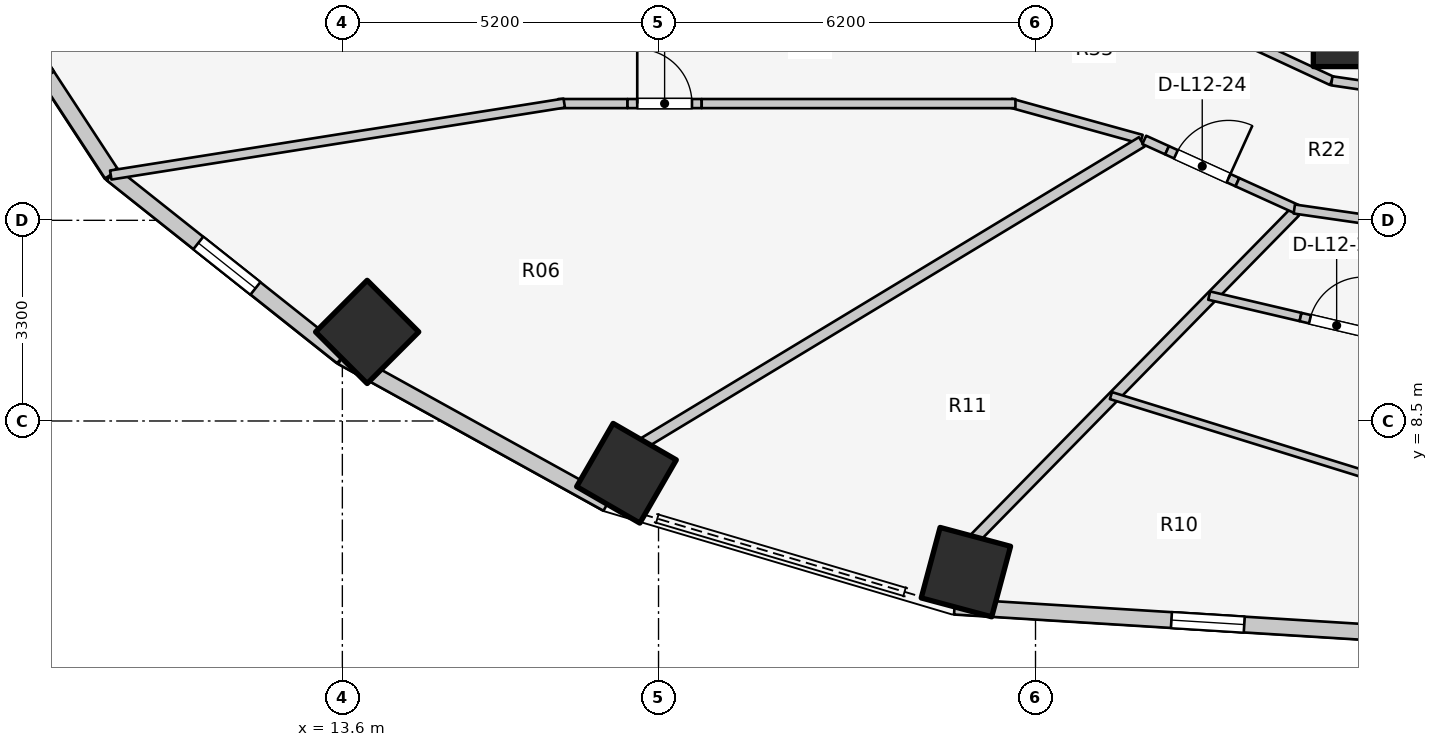
"""IFC4 building model, lengths in metres.
Left out: names, types, materials, properties, quantities, classifications, styles, units other than length and angle.
Written with IfcOpenShell. Run it as: python <this file> out.ifc"""

import sys

from ifc_helpers import new_model, si_unit, direction, frame, frame_2d, origin, origin_2d, place, context, subcontext, project, spatial, rectangle, extrude, element, fill, save


model = new_model("IFC4")
c1 = context("Model", 3, precision=1e-05, world=origin(), true_north=direction((0.0, 1.0)))
c2 = subcontext(c1, "Body", "Model", "MODEL_VIEW")
j1 = project(units=[si_unit("LENGTHUNIT", "METRE"), si_unit("PLANEANGLEUNIT", "RADIAN")], contexts=[c1])
p1 = place(None, origin())
s1 = spatial("IfcSite", under=j1, at=p1, CompositionType="ELEMENT")
p2 = place(p1, origin())
s2 = spatial("IfcBuilding", under=s1, at=p2, CompositionType="ELEMENT")
p3 = place(p2, frame((0.0, 0.0, 43.1)))
s3 = spatial("IfcBuildingStorey", under=s2, at=p3, CompositionType="ELEMENT", Elevation=43.1)
for number, where, z_axis, x_axis in (
    (1, (14.008, 9.965, 0.0), (0.0, 0.0, 1.0), (-0.707, -0.707, 0.0)),
    (2, (18.273, 7.641, 0.0), (0.0, 0.0, 1.0), (-0.5, -0.866, 0.0)),
):
    element("IfcColumn", number, at=place(p3, frame(where, z_axis=z_axis, x_axis=x_axis)), inside=s3, PredefinedType="COLUMN", context=c2, shape_type="SweptSolid", body=[
        extrude(rectangle(XDim=1.2, YDim=1.2, at=origin_2d()), origin(), (0.0, 0.0, 1.0), 3.1),
    ])
p4 = place(p3, frame((30.069, 14.828, 0.0), z_axis=(0.0, 0.0, 1.0), x_axis=(1.0, 0.0, 0.0)))
e3 = element("IfcColumn", 3, at=p4, inside=s3, PredefinedType="COLUMN", context=c2, shape_type="SweptSolid", body=[
    extrude(rectangle(XDim=1.0, YDim=1.0, at=origin_2d()), origin(), (0.0, 0.0, 1.0), 3.1),
])
p5 = place(p3, frame((23.855, 6.014, 0.0), z_axis=(0.0, 0.0, 1.0), x_axis=(-0.258819045103, -0.965925826289, 0.0)))
e4 = element("IfcColumn", 4, at=p5, inside=s3, PredefinedType="COLUMN", context=c2, shape_type="SweptSolid", body=[
    extrude(rectangle(XDim=1.2, YDim=1.2, at=origin_2d()), origin(), (0.0, 0.0, 1.0), 3.1),
])
p6 = place(p3, frame((7.033, 16.795, 0.0), z_axis=(0.0, 0.0, 1.0), x_axis=(0.547702757047, -0.836672988642, 0.0)))
e5 = element("IfcWall", 5, at=p6, inside=s3, PredefinedType="STANDARD", context=c2, shape_type="SweptSolid", body=[
    extrude(rectangle(XDim=5.062, YDim=0.26, at=frame_2d((2.531, 0.0))), origin(), (0.0, 0.0, 1.0), 1.22),
])
p7 = place(p6, frame((1.931, 0.0, 0.15)))
e6 = element("IfcOpeningElement", 6, at=p7, cuts=e5, PredefinedType="OPENING", context=c2, shape_type="SweptSolid", body=[
    extrude(rectangle(XDim=1.2, YDim=0.9, at=frame_2d((0.6, 0.45))), frame((0.0, 0.14, 0.0), z_axis=(0.0, -1.0, 0.0), x_axis=(1.0, 0.0, 0.0)), (0.0, 0.0, 1.0), 0.28),
])
p8 = place(p3, frame((9.806, 12.559, 0.0), z_axis=(0.0, 0.0, 1.0), x_axis=(0.783123133379, -0.621866672179, 0.0)))
e7 = element("IfcWall", 7, at=p8, inside=s3, PredefinedType="STANDARD", context=c2, shape_type="SweptSolid", body=[
    extrude(rectangle(XDim=4.839, YDim=0.26, at=frame_2d((2.419, 0.0))), origin(), (0.0, 0.0, 1.0), 1.22),
])
p9 = place(p8, frame((1.819, 0.0, 0.15)))
e8 = element("IfcOpeningElement", 8, at=p9, cuts=e7, PredefinedType="OPENING", context=c2, shape_type="SweptSolid", body=[
    extrude(rectangle(XDim=1.2, YDim=0.9, at=frame_2d((0.6, 0.45))), frame((0.0, 0.14, 0.0), z_axis=(0.0, -1.0, 0.0), x_axis=(1.0, 0.0, 0.0)), (0.0, 0.0, 1.0), 0.28),
])
p10 = place(p3, frame((13.595, 9.55, 0.0), z_axis=(0.0, 0.0, 1.0), x_axis=(0.875137303239, -0.483874674352, 0.0)))
e9 = element("IfcWall", 9, at=p10, inside=s3, PredefinedType="STANDARD", context=c2, shape_type="SweptSolid", body=[
    extrude(rectangle(XDim=4.985, YDim=0.26, at=frame_2d((2.493, 0.0))), origin(), (0.0, 0.0, 1.0), 1.22),
])
p11 = place(p3, frame((23.668, 5.447, 0.0), z_axis=(0.0, 0.0, 1.0), x_axis=(0.998090514779, -0.061768311519, 0.0)))
e10 = element("IfcWall", 10, at=p11, inside=s3, PredefinedType="STANDARD", context=c2, shape_type="SweptSolid", body=[
    extrude(rectangle(XDim=8.348, YDim=0.26, at=frame_2d((4.174, 0.0))), origin(), (0.0, 0.0, 1.0), 1.22),
])
p12 = place(p11, frame((3.574, 0.0, 0.15)))
e11 = element("IfcOpeningElement", 11, at=p12, cuts=e10, PredefinedType="OPENING", context=c2, shape_type="SweptSolid", body=[
    extrude(rectangle(XDim=1.2, YDim=0.9, at=frame_2d((0.6, 0.45))), frame((0.0, 0.14, 0.0), z_axis=(0.0, -1.0, 0.0), x_axis=(1.0, 0.0, 0.0)), (0.0, 0.0, 1.0), 0.28),
])
p13 = place(p3, frame((27.89, 15.015, 0.0), z_axis=(0.0, 0.0, 1.0), x_axis=(0.906943449489, -0.421252393975, 0.0)))
e12 = element("IfcWall", 12, at=p13, inside=s3, PredefinedType="PARTITIONING", context=c2, shape_type="SweptSolid", body=[
    extrude(rectangle(XDim=2.186, YDim=0.15, at=frame_2d((1.093, 0.0))), origin(), (0.0, 0.0, 1.0), 1.957),
])
p14 = place(p3, frame((29.873, 14.094, 0.0), z_axis=(0.0, 0.0, 1.0), x_axis=(0.989268584896, -0.146108408166, 0.0)))
e13 = element("IfcWall", 13, at=p14, inside=s3, PredefinedType="PARTITIONING", context=c2, shape_type="SweptSolid", body=[
    extrude(rectangle(XDim=2.151, YDim=0.15, at=frame_2d((1.075, 0.0))), origin(), (0.0, 0.0, 1.0), 1.957),
])
p15 = place(p3, frame((26.742, 13.133, 0.0), z_axis=(0.0, 0.0, 1.0), x_axis=(-0.963833843713, 0.266503886865, 0.0)))
e14 = element("IfcWall", 14, at=p15, inside=s3, PredefinedType="PARTITIONING", context=c2, shape_type="SweptSolid", body=[
    extrude(rectangle(XDim=2.232, YDim=0.15, at=frame_2d((1.116, 0.0))), origin(), (0.0, 0.0, 1.0), 1.957),
])
p16 = place(p3, frame((17.15, 13.72, 0.0), z_axis=(0.0, 0.0, 1.0), x_axis=(1.0, 0.0, 0.0)))
e15 = element("IfcWall", 15, at=p16, inside=s3, PredefinedType="PARTITIONING", context=c2, shape_type="SweptSolid", body=[
    extrude(rectangle(XDim=1.14, YDim=0.15, at=frame_2d((0.57, 0.0))), origin(), (0.0, 0.0, 1.0), 2.575),
])
p17 = place(p3, frame((18.29, 13.72, 0.0), z_axis=(0.0, 0.0, 1.0), x_axis=(1.0, 0.0, 0.0)))
e16 = element("IfcWall", 16, at=p17, inside=s3, PredefinedType="PARTITIONING", context=c2, shape_type="SweptSolid", body=[
    extrude(rectangle(XDim=1.22, YDim=0.15, at=frame_2d((0.61, 0.0))), origin(), (0.0, 0.0, 1.0), 2.575),
])
p18 = place(p17, frame((0.16, 0.0, 0.0)))
e17 = element("IfcOpeningElement", 17, at=p18, cuts=e16, PredefinedType="OPENING", context=c2, shape_type="SweptSolid", body=[
    extrude(rectangle(XDim=0.9, YDim=2.1, at=frame_2d((0.45, 1.05))), frame((0.0, 0.085, 0.0), z_axis=(0.0, -1.0, 0.0), x_axis=(1.0, 0.0, 0.0)), (0.0, 0.0, 1.0), 0.17),
])
p19 = place(p3, frame((19.51, 13.72, 0.0), z_axis=(0.0, 0.0, 1.0), x_axis=(1.0, 0.0, 0.0)))
e18 = element("IfcWall", 18, at=p19, inside=s3, PredefinedType="PARTITIONING", context=c2, shape_type="SweptSolid", body=[
    extrude(rectangle(XDim=5.16, YDim=0.15, at=frame_2d((2.58, 0.0))), origin(), (0.0, 0.0, 1.0), 1.957),
])
p20 = place(p3, frame((17.25, 13.728, 0.0), z_axis=(0.0, 0.0, 1.0), x_axis=(-0.987655781226, -0.156639898525, 0.0)))
e19 = element("IfcWall", 19, at=p20, inside=s3, PredefinedType="PARTITIONING", context=c2, shape_type="SweptSolid", body=[
    extrude(rectangle(XDim=7.552, YDim=0.15, at=frame_2d((3.776, 0.0))), origin(), (0.0, 0.0, 1.0), 1.22),
])
p21 = place(p3, frame((26.748, 13.09, 0.0), z_axis=(0.0, 0.0, 1.0), x_axis=(-0.855817136021, -0.517278483694, 0.0)))
e20 = element("IfcWall", 20, at=p21, inside=s3, PredefinedType="PARTITIONING", context=c2, shape_type="SweptSolid", body=[
    extrude(rectangle(XDim=9.564, YDim=0.18, at=frame_2d((4.782, 0.0))), origin(), (0.0, 0.0, 1.0), 1.957),
])
p22 = place(p3, frame((29.267, 11.939, 0.0), z_axis=(0.0, 0.0, 1.0), x_axis=(-0.700234780085, -0.713912636644, 0.0)))
e21 = element("IfcWall", 21, at=p22, inside=s3, PredefinedType="PARTITIONING", context=c2, shape_type="SweptSolid", body=[
    extrude(rectangle(XDim=7.515, YDim=0.18, at=frame_2d((3.757, 0.0))), origin(), (0.0, 0.0, 1.0), 1.957),
])
p23 = place(p3, frame((26.789, 13.123, 0.0), z_axis=(0.0, 0.0, 1.0), x_axis=(0.910630236002, -0.413222183915, 0.0)))
e22 = element("IfcWall", 22, at=p23, inside=s3, PredefinedType="PARTITIONING", context=c2, shape_type="SweptSolid", body=[
    extrude(rectangle(XDim=0.412, YDim=0.15, at=frame_2d((0.206, 0.0))), origin(), (0.0, 0.0, 1.0), 2.575),
])
p24 = place(p3, frame((27.164, 12.952, 0.0), z_axis=(0.0, 0.0, 1.0), x_axis=(0.910524396382, -0.413455346552, 0.0)))
e23 = element("IfcWall", 23, at=p24, inside=s3, PredefinedType="PARTITIONING", context=c2, shape_type="SweptSolid", body=[
    extrude(rectangle(XDim=1.27, YDim=0.15, at=frame_2d((0.635, 0.0))), origin(), (0.0, 0.0, 1.0), 2.16),
])
p25 = place(p24, frame((0.16, 0.0, 0.0)))
e24 = element("IfcOpeningElement", 24, at=p25, cuts=e23, PredefinedType="OPENING", context=c2, shape_type="SweptSolid", body=[
    extrude(rectangle(XDim=0.95, YDim=2.1, at=frame_2d((0.475, 1.05))), frame((0.0, 0.085, 0.0), z_axis=(0.0, -1.0, 0.0), x_axis=(1.0, 0.0, 0.0)), (0.0, 0.0, 1.0), 0.17),
])
p26 = place(p3, frame((28.32, 12.427, 0.0), z_axis=(0.0, 0.0, 1.0), x_axis=(0.910596482868, -0.413296558645, 0.0)))
e25 = element("IfcWall", 25, at=p26, inside=s3, PredefinedType="PARTITIONING", context=c2, shape_type="SweptSolid", body=[
    extrude(rectangle(XDim=1.09, YDim=0.15, at=frame_2d((0.545, 0.0))), origin(), (0.0, 0.0, 1.0), 1.957),
])
p27 = place(p3, frame((26.241, 8.917, 0.0), z_axis=(0.0, 0.0, 1.0), x_axis=(0.955191504197, -0.29598849692, 0.0)))
e26 = element("IfcWall", 26, at=p27, inside=s3, PredefinedType="MOVABLE", context=c2, shape_type="SweptSolid", body=[
    extrude(rectangle(XDim=6.039, YDim=0.12, at=frame_2d((3.02, 0.0))), origin(), (0.0, 0.0, 1.0), 1.957),
])
p28 = place(p3, frame((29.256, 11.986, 0.0), z_axis=(0.0, 0.0, 1.0), x_axis=(0.989761784218, -0.142729150844, 0.0)))
e27 = element("IfcWall", 27, at=p28, inside=s3, PredefinedType="PARTITIONING", context=c2, shape_type="SweptSolid", body=[
    extrude(rectangle(XDim=2.822, YDim=0.15, at=frame_2d((1.411, 0.0))), origin(), (0.0, 0.0, 1.0), 1.957),
])
p29 = place(p3, frame((27.856, 10.562, 0.0), z_axis=(0.0, 0.0, 1.0), x_axis=(0.973549808771, -0.228474877924, 0.0)))
e28 = element("IfcWall", 28, at=p29, inside=s3, PredefinedType="PLUMBINGWALL", context=c2, shape_type="SweptSolid", body=[
    extrude(rectangle(XDim=1.543, YDim=0.14, at=frame_2d((0.771, 0.0))), origin(), (0.0, 0.0, 1.0), 2.105),
])
p30 = place(p3, frame((29.359, 10.21, 0.0), z_axis=(0.0, 0.0, 1.0), x_axis=(0.97353775554, -0.228526231619, 0.0)))
e29 = element("IfcWall", 29, at=p30, inside=s3, PredefinedType="PLUMBINGWALL", context=c2, shape_type="SweptSolid", body=[
    extrude(rectangle(XDim=1.22, YDim=0.14, at=frame_2d((0.61, 0.0))), origin(), (0.0, 0.0, 1.0), 2.16),
])
p31 = place(p30, frame((0.16, 0.0, 0.0)))
e30 = element("IfcOpeningElement", 30, at=p31, cuts=e29, PredefinedType="OPENING", context=c2, shape_type="SweptSolid", body=[
    extrude(rectangle(XDim=0.9, YDim=2.1, at=frame_2d((0.45, 1.05))), frame((0.0, 0.08, 0.0), z_axis=(0.0, -1.0, 0.0), x_axis=(1.0, 0.0, 0.0)), (0.0, 0.0, 1.0), 0.16),
])
p32 = place(p9, origin())
e31 = element("IfcWindow", 31, at=p32, inside=s3, PartitioningType="SINGLE_PANEL", PredefinedType="WINDOW", context=c2, shape_type="SweptSolid", body=[
    extrude(rectangle(XDim=1.2, YDim=0.9, at=frame_2d((0.6, 0.45))), frame((0.0, 0.03, 0.0), z_axis=(0.0, -1.0, 0.0), x_axis=(1.0, 0.0, 0.0)), (0.0, 0.0, 1.0), 0.06),
])
fill(e8, e31)
p33 = place(p12, origin())
e32 = element("IfcWindow", 32, at=p33, inside=s3, PartitioningType="SINGLE_PANEL", PredefinedType="WINDOW", context=c2, shape_type="SweptSolid", body=[
    extrude(rectangle(XDim=1.2, YDim=0.9, at=frame_2d((0.6, 0.45))), frame((0.0, 0.03, 0.0), z_axis=(0.0, -1.0, 0.0), x_axis=(1.0, 0.0, 0.0)), (0.0, 0.0, 1.0), 0.06),
])
fill(e11, e32)
p34 = place(p18, origin())
e33 = element("IfcDoor", 33, at=p34, inside=s3, OperationType="SINGLE_SWING_LEFT", PredefinedType="DOOR", context=c2, shape_type="SweptSolid", body=[
    extrude(rectangle(XDim=0.9, YDim=2.1, at=frame_2d((0.45, 1.05))), frame((0.0, 0.025, 0.0), z_axis=(0.0, -1.0, 0.0), x_axis=(1.0, 0.0, 0.0)), (0.0, 0.0, 1.0), 0.05),
])
fill(e17, e33)
p35 = place(p25, origin())
e34 = element("IfcDoor", 34, at=p35, inside=s3, OperationType="SINGLE_SWING_RIGHT", PredefinedType="DOOR", context=c2, shape_type="SweptSolid", body=[
    extrude(rectangle(XDim=0.95, YDim=2.1, at=frame_2d((0.475, 1.05))), frame((0.0, 0.025, 0.0), z_axis=(0.0, -1.0, 0.0), x_axis=(1.0, 0.0, 0.0)), (0.0, 0.0, 1.0), 0.05),
])
fill(e24, e34)
p36 = place(p31, origin())
e35 = element("IfcDoor", 35, at=p36, inside=s3, OperationType="SINGLE_SWING_RIGHT", PredefinedType="DOOR", context=c2, shape_type="SweptSolid", body=[
    extrude(rectangle(XDim=0.9, YDim=2.1, at=frame_2d((0.45, 1.05))), frame((0.0, 0.025, 0.0), z_axis=(0.0, -1.0, 0.0), x_axis=(1.0, 0.0, 0.0)), (0.0, 0.0, 1.0), 0.05),
])
fill(e30, e35)
save(model, sys.argv[1])
